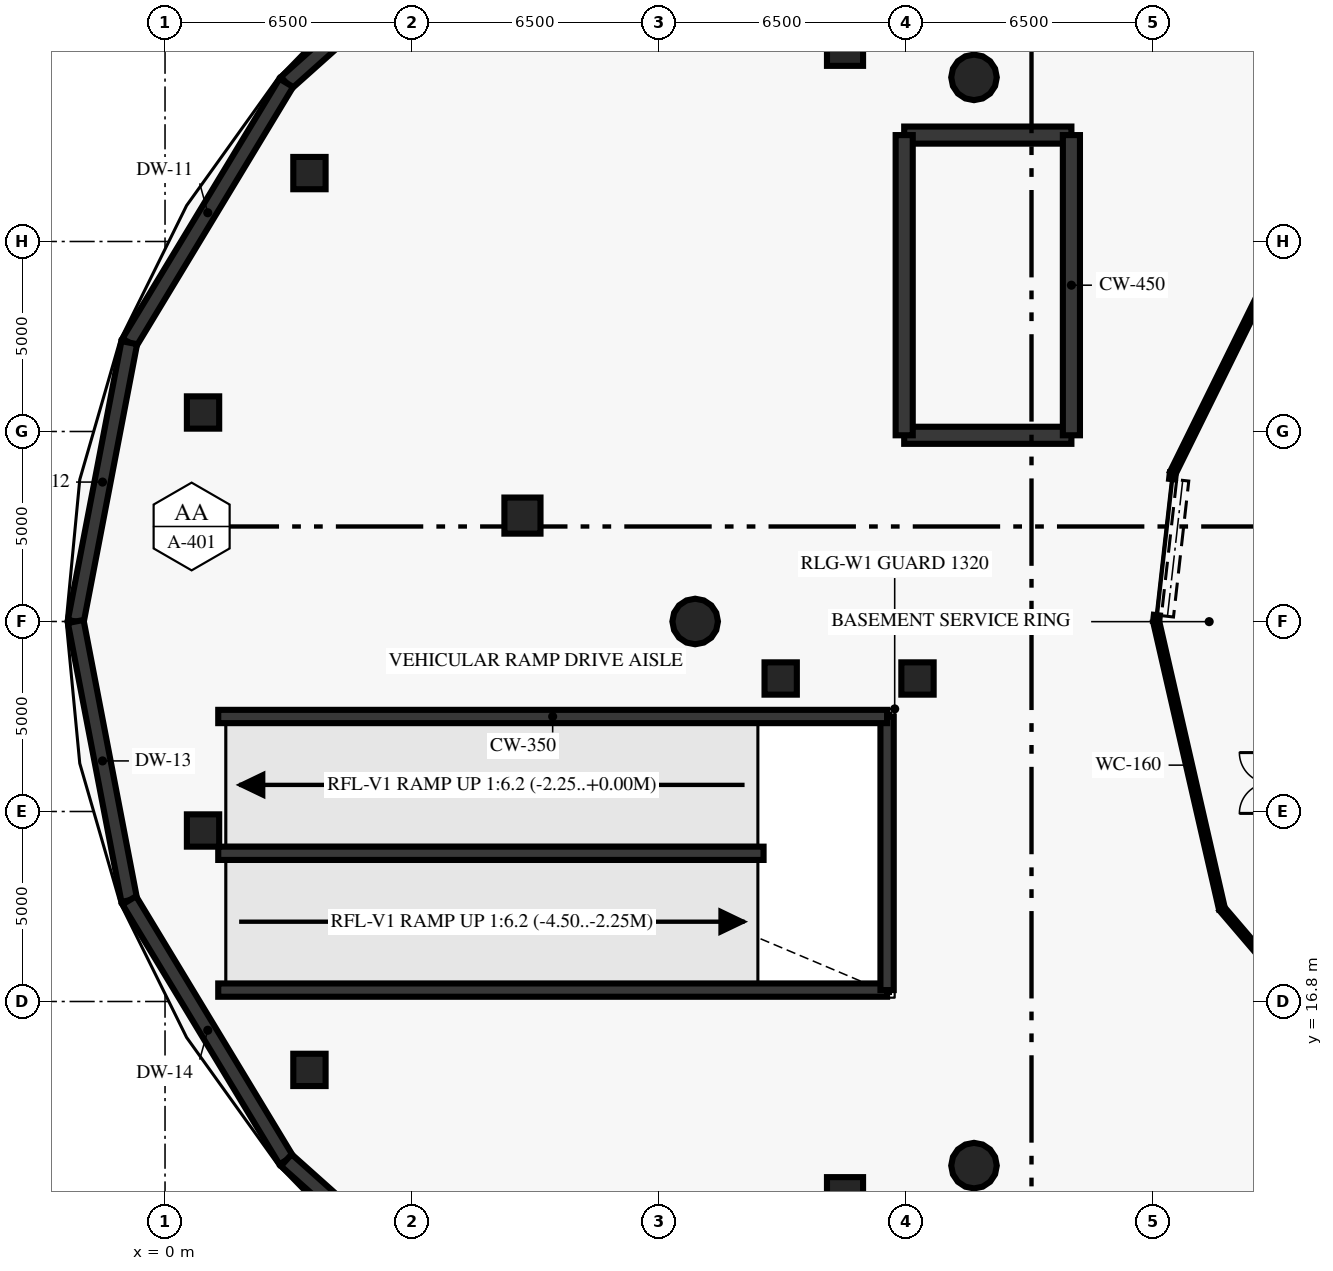
"""IFC4 building model, lengths in metres.
Left out: names, types, materials, properties, quantities, classifications, styles, units other than length and angle.
Written with IfcOpenShell. Run it as: python <this file> out.ifc"""

import sys

from ifc_helpers import new_model, si_unit, direction, frame, frame_2d, origin, origin_2d, place, context, subcontext, project, spatial, rectangle, circle, extrude, element, fill, save


model = new_model("IFC4")
c1 = context("Model", 3, precision=1e-05, world=origin(), true_north=direction((0.0, 1.0)))
c2 = subcontext(c1, "Body", "Model", "MODEL_VIEW")
j1 = project(units=[si_unit("LENGTHUNIT", "METRE"), si_unit("PLANEANGLEUNIT", "RADIAN")], contexts=[c1])
p1 = place(None, origin())
s1 = spatial("IfcSite", under=j1, at=p1, CompositionType="ELEMENT")
p2 = place(p1, origin())
s2 = spatial("IfcBuilding", under=s1, at=p2, CompositionType="ELEMENT")
p3 = place(p2, frame((0.0, 0.0, -4.5)))
s3 = spatial("IfcBuildingStorey", under=s2, at=p3, CompositionType="ELEMENT", Elevation=-4.5)
for number, where, z_axis, x_axis in (
    (1, (21.287, 41.119, 0.0), (0.0, 0.0, 1.0), (1.0, 0.0, 0.0)),
    (2, (13.95, 26.8, 0.0), (0.0, 0.0, 1.0), (1.0, 0.0, 0.0)),
    (3, (21.287, 12.481, 0.0), (0.0, 0.0, 1.0), (1.0, 0.0, 0.0)),
):
    element("IfcColumn", number, at=place(p3, frame(where, z_axis=z_axis, x_axis=x_axis)), inside=s3, PredefinedType="COLUMN", context=c2, shape_type="SweptSolid", body=[
        extrude(circle(Radius=0.6, at=origin_2d()), origin(), (0.0, 0.0, 1.0), 4.18),
    ])
for number, where, z_axis, x_axis in (
    (4, (17.893, 41.897, 0.0), (0.0, 0.0, 1.0), (1.0, 0.0, 0.0)),
    (5, (9.405, 29.587, 0.0), (0.0, 0.0, 1.0), (1.0, 0.0, 0.0)),
    (6, (17.893, 11.703, 0.0), (0.0, 0.0, 1.0), (1.0, 0.0, 0.0)),
):
    element("IfcColumn", number, at=place(p3, frame(where, z_axis=z_axis, x_axis=x_axis)), inside=s3, PredefinedType="COLUMN", context=c2, shape_type="SweptSolid", body=[
        extrude(rectangle(XDim=0.95, YDim=0.95, at=origin_2d()), origin(), (0.0, 0.0, 1.0), 4.18),
    ])
for number, where, z_axis, x_axis in (
    (7, (1.0, 21.3, 0.0), (0.0, 0.0, 1.0), (1.0, 0.0, 0.0)),
    (8, (3.8, 15.0, 0.0), (0.0, 0.0, 1.0), (1.0, 0.0, 0.0)),
    (9, (1.0, 32.3, 0.0), (0.0, 0.0, 1.0), (1.0, 0.0, 0.0)),
    (10, (3.8, 38.6, 0.0), (0.0, 0.0, 1.0), (1.0, 0.0, 0.0)),
    (11, (16.2, 25.3, 0.0), (0.0, 0.0, 1.0), (1.0, 0.0, 0.0)),
    (12, (19.8, 25.3, 0.0), (0.0, 0.0, 1.0), (1.0, 0.0, 0.0)),
):
    element("IfcColumn", number, at=place(p3, frame(where, z_axis=z_axis, x_axis=x_axis)), inside=s3, PredefinedType="COLUMN", context=c2, shape_type="SweptSolid", body=[
        extrude(rectangle(XDim=0.85, YDim=0.85, at=origin_2d()), origin(), (0.0, 0.0, 1.0), 4.18),
    ])
p4 = place(p3, frame((9.761, 46.846, 0.0), z_axis=(0.0, 0.0, 1.0), x_axis=(-0.745720826992, -0.666258544554, 0.0)))
e13 = element("IfcWall", 13, at=p4, inside=s3, PredefinedType="SHEAR", context=c2, shape_type="SweptSolid", body=[
    extrude(rectangle(XDim=8.812, YDim=0.42, at=frame_2d((4.406, 0.0))), origin(), (0.0, 0.0, 1.0), 4.18),
])
p5 = place(p3, frame((3.19, 40.975, 0.0), z_axis=(0.0, 0.0, 1.0), x_axis=(-0.517122636798, -0.85591131463, 0.0)))
e14 = element("IfcWall", 14, at=p5, inside=s3, PredefinedType="SHEAR", context=c2, shape_type="SweptSolid", body=[
    extrude(rectangle(XDim=7.988, YDim=0.42, at=frame_2d((3.994, 0.0))), origin(), (0.0, 0.0, 1.0), 4.18),
])
p6 = place(p3, frame((-0.941, 34.138, 0.0), z_axis=(0.0, 0.0, 1.0), x_axis=(-0.188595316219, -0.982054889861, 0.0)))
e15 = element("IfcWall", 15, at=p6, inside=s3, PredefinedType="SHEAR", context=c2, shape_type="SweptSolid", body=[
    extrude(rectangle(XDim=7.472, YDim=0.42, at=frame_2d((3.736, 0.0))), origin(), (0.0, 0.0, 1.0), 4.18),
])
p7 = place(p3, frame((-2.35, 26.8, 0.0), z_axis=(0.0, 0.0, 1.0), x_axis=(0.188589264795, -0.982056051966, 0.0)))
e16 = element("IfcWall", 16, at=p7, inside=s3, PredefinedType="SHEAR", context=c2, shape_type="SweptSolid", body=[
    extrude(rectangle(XDim=7.472, YDim=0.42, at=frame_2d((3.736, 0.0))), origin(), (0.0, 0.0, 1.0), 4.18),
])
p8 = place(p3, frame((-0.941, 19.462, 0.0), z_axis=(0.0, 0.0, 1.0), x_axis=(0.517136164524, -0.855903141332, 0.0)))
e17 = element("IfcWall", 17, at=p8, inside=s3, PredefinedType="SHEAR", context=c2, shape_type="SweptSolid", body=[
    extrude(rectangle(XDim=7.988, YDim=0.42, at=frame_2d((3.994, 0.0))), origin(), (0.0, 0.0, 1.0), 4.18),
])
p9 = place(p3, frame((3.19, 12.625, 0.0), z_axis=(0.0, 0.0, 1.0), x_axis=(0.745707061302, -0.666273951707, 0.0)))
e18 = element("IfcWall", 18, at=p9, inside=s3, PredefinedType="SHEAR", context=c2, shape_type="SweptSolid", body=[
    extrude(rectangle(XDim=8.812, YDim=0.42, at=frame_2d((4.406, 0.0))), origin(), (0.0, 0.0, 1.0), 4.18),
])
p10 = place(p3, frame((1.4, 17.1, 0.0), z_axis=(0.0, 0.0, 1.0), x_axis=(1.0, 0.0, 0.0)))
e19 = element("IfcWall", 19, at=p10, inside=s3, PredefinedType="SHEAR", context=c2, shape_type="SweptSolid", body=[
    extrude(rectangle(XDim=17.6, YDim=0.35, at=frame_2d((8.8, 0.0))), origin(), (0.0, 0.0, 1.0), 4.18),
])
p11 = place(p3, frame((19.0, 17.1, 0.0), z_axis=(0.0, 0.0, 1.0), x_axis=(0.0, 1.0, 0.0)))
e20 = element("IfcWall", 20, at=p11, inside=s3, PredefinedType="SHEAR", context=c2, shape_type="SweptSolid", body=[
    extrude(rectangle(XDim=7.2, YDim=0.35, at=frame_2d((3.6, 0.0))), origin(), (0.0, 0.0, 1.0), 4.18),
])
p12 = place(p3, frame((1.4, 24.3, 0.0), z_axis=(0.0, 0.0, 1.0), x_axis=(1.0, 0.0, 0.0)))
e21 = element("IfcWall", 21, at=p12, inside=s3, PredefinedType="SHEAR", context=c2, shape_type="SweptSolid", body=[
    extrude(rectangle(XDim=17.6, YDim=0.35, at=frame_2d((8.8, 0.0))), origin(), (0.0, 0.0, 1.0), 4.18),
])
p13 = place(p3, frame((1.4, 20.7, 0.0), z_axis=(0.0, 0.0, 1.0), x_axis=(1.0, 0.0, 0.0)))
e22 = element("IfcWall", 22, at=p13, inside=s3, PredefinedType="SHEAR", context=c2, shape_type="SweptSolid", body=[
    extrude(rectangle(XDim=14.35, YDim=0.35, at=frame_2d((7.175, 0.0))), origin(), (0.0, 0.0, 1.0), 4.18),
])
for number, where, z_axis, x_axis in (
    (23, (19.45, 31.7, 0.0), (0.0, 0.0, 1.0), (1.0, 0.0, 0.0)),
    (24, (19.45, 39.6, 0.0), (0.0, 0.0, 1.0), (1.0, 0.0, 0.0)),
):
    element("IfcWall", number, at=place(p3, frame(where, z_axis=z_axis, x_axis=x_axis)), inside=s3, PredefinedType="SHEAR", context=c2, shape_type="SweptSolid", body=[
        extrude(rectangle(XDim=4.4, YDim=0.45, at=frame_2d((2.2, 0.0))), origin(), (0.0, 0.0, 1.0), 4.18),
    ])
for number, where, z_axis, x_axis in (
    (25, (19.45, 31.7, 0.0), (0.0, 0.0, 1.0), (0.0, 1.0, 0.0)),
    (26, (23.85, 31.7, 0.0), (0.0, 0.0, 1.0), (0.0, 1.0, 0.0)),
):
    element("IfcWall", number, at=place(p3, frame(where, z_axis=z_axis, x_axis=x_axis)), inside=s3, PredefinedType="SHEAR", context=c2, shape_type="SweptSolid", body=[
        extrude(rectangle(XDim=7.9, YDim=0.45, at=frame_2d((3.95, 0.0))), origin(), (0.0, 0.0, 1.0), 4.18),
    ])
p14 = place(p3, frame((29.864, 37.491, 0.0), z_axis=(0.0, 0.0, 1.0), x_axis=(-0.44243947754, -0.896798365696, 0.0)))
e27 = element("IfcWall", 27, at=p14, inside=s3, PredefinedType="PARTITIONING", context=c2, shape_type="SweptSolid", body=[
    extrude(rectangle(XDim=7.558, YDim=0.16, at=frame_2d((3.779, 0.0))), origin(), (0.0, 0.0, 1.0), 4.18),
])
p15 = place(p3, frame((26.52, 30.713, 0.0), z_axis=(0.0, 0.0, 1.0), x_axis=(-0.111731247657, -0.993738460711, 0.0)))
e28 = element("IfcWall", 28, at=p15, inside=s3, PredefinedType="PARTITIONING", context=c2, shape_type="SweptSolid", body=[
    extrude(rectangle(XDim=3.938, YDim=0.16, at=frame_2d((1.969, 0.0))), origin(), (0.0, 0.0, 1.0), 4.18),
])
p16 = place(p15, frame((0.169, 0.0, 0.0)))
e29 = element("IfcOpeningElement", 29, at=p16, cuts=e28, PredefinedType="OPENING", context=c2, shape_type="SweptSolid", body=[
    extrude(rectangle(XDim=3.6, YDim=2.4, at=frame_2d((1.8, 1.2))), frame((0.0, 0.09, 0.0), z_axis=(0.0, -1.0, 0.0), x_axis=(1.0, 0.0, 0.0)), (0.0, 0.0, 1.0), 0.18),
])
p17 = place(p3, frame((26.08, 26.8, 0.0), z_axis=(0.0, 0.0, 1.0), x_axis=(0.223185487206, -0.974775993909, 0.0)))
e30 = element("IfcWall", 30, at=p17, inside=s3, PredefinedType="PARTITIONING", context=c2, shape_type="SweptSolid", body=[
    extrude(rectangle(XDim=7.756, YDim=0.16, at=frame_2d((3.878, 0.0))), origin(), (0.0, 0.0, 1.0), 4.18),
])
p18 = place(p3, frame((27.811, 19.24, 0.0), z_axis=(0.0, 0.0, 1.0), x_axis=(0.649652680018, -0.760231145998, 0.0)))
e31 = element("IfcWall", 31, at=p18, inside=s3, PredefinedType="PARTITIONING", context=c2, shape_type="SweptSolid", body=[
    extrude(rectangle(XDim=7.279, YDim=0.16, at=frame_2d((3.64, 0.0))), origin(), (0.0, 0.0, 1.0), 4.18),
])
p19 = place(p16, origin())
e32 = element("IfcDoor", 32, at=p19, inside=s3, OperationType="ROLLINGUP", PredefinedType="GATE", context=c2, shape_type="SweptSolid", body=[
    extrude(rectangle(XDim=3.6, YDim=2.4, at=frame_2d((1.8, 1.2))), frame((0.0, 0.025, 0.0), z_axis=(0.0, -1.0, 0.0), x_axis=(1.0, 0.0, 0.0)), (0.0, 0.0, 1.0), 0.05),
])
fill(e29, e32)
save(model, sys.argv[1])
